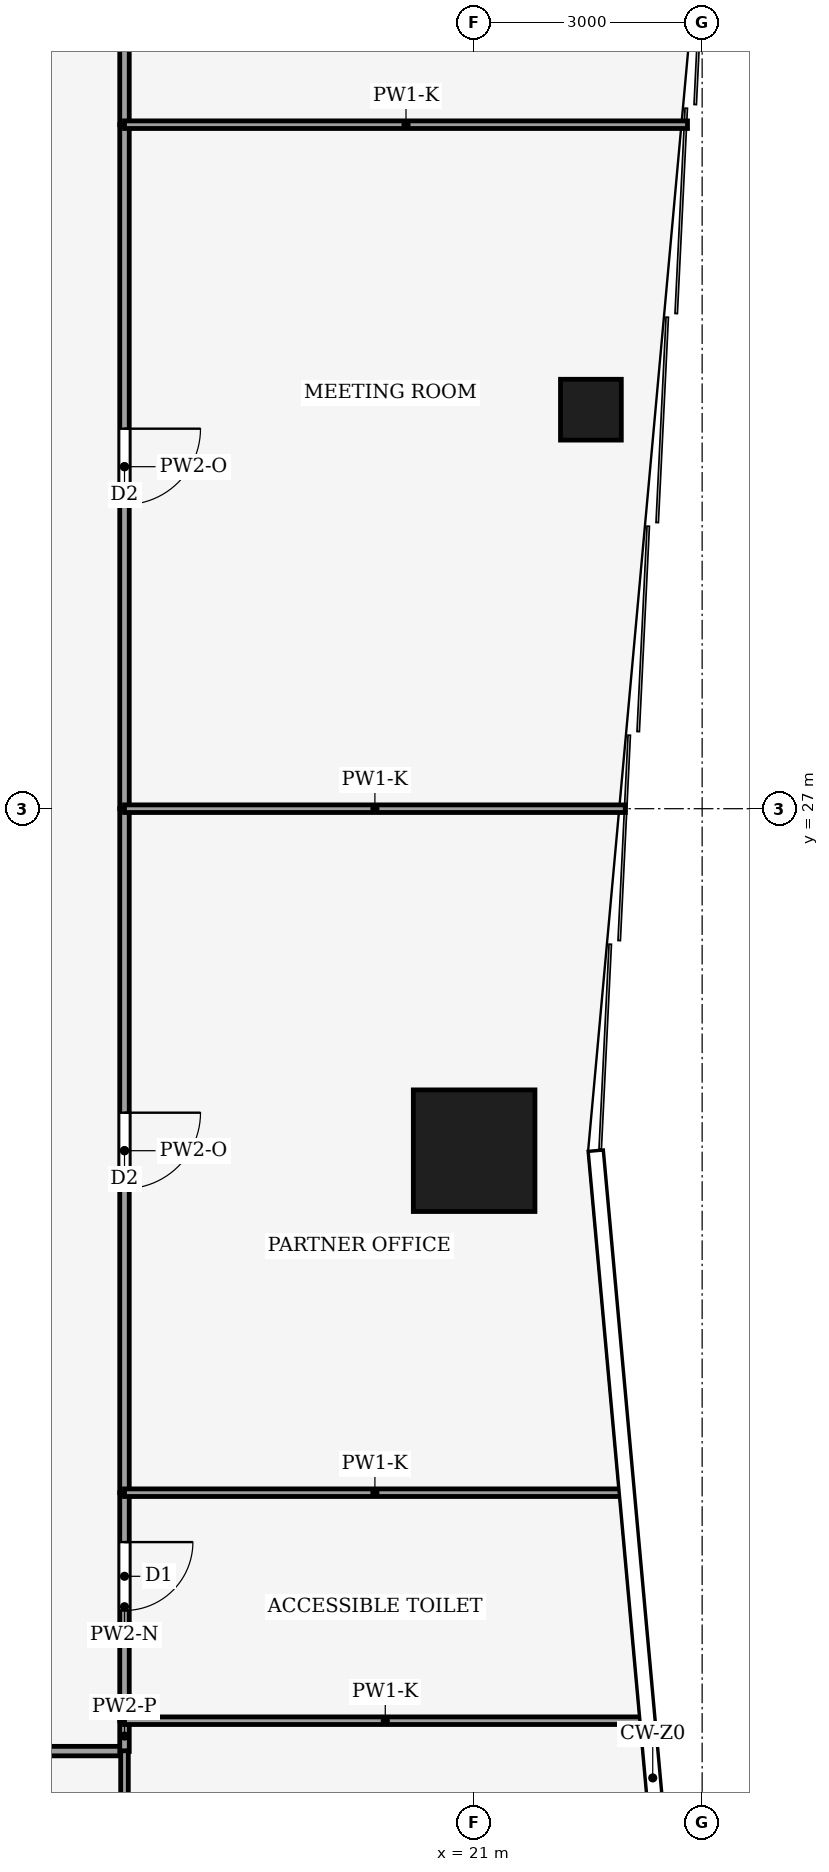
"""IFC4 building model, lengths in metres.
Left out: names, types, materials, properties, quantities, classifications, styles, units other than length and angle.
Written with IfcOpenShell. Run it as: python <this file> out.ifc"""

import sys

from ifc_helpers import new_model, si_unit, direction, frame, frame_2d, origin, origin_2d, place, context, subcontext, project, spatial, rectangle, hollow_rectangle, extrude, element, fill, save


model = new_model("IFC4")
c1 = context("Model", 3, precision=1e-05, world=origin(), true_north=direction((0.0, 1.0)))
c2 = subcontext(c1, "Body", "Model", "MODEL_VIEW")
j1 = project(units=[si_unit("LENGTHUNIT", "METRE"), si_unit("PLANEANGLEUNIT", "RADIAN")], contexts=[c1])
p1 = place(None, origin())
s1 = spatial("IfcSite", under=j1, at=p1, CompositionType="ELEMENT")
p2 = place(p1, origin())
s2 = spatial("IfcBuilding", under=s1, at=p2, CompositionType="ELEMENT")
p3 = place(p2, frame((0.0, 0.0, 54.0)))
s3 = spatial("IfcBuildingStorey", under=s2, at=p3, CompositionType="ELEMENT", Elevation=54.0)
p4 = place(p3, frame((21.0, 22.5, 0.0), z_axis=(0.0, 0.0, 1.0), x_axis=(1.0, 0.0, 0.0)))
e1 = element("IfcColumn", 1, at=p4, inside=s3, PredefinedType="COLUMN", context=c2, shape_type="SweptSolid", body=[
    extrude(hollow_rectangle(XDim=1.6, YDim=1.6, WallThickness=0.09, at=origin_2d()), origin(), (0.0, 0.0, 1.0), 4.0),
])
p5 = place(p3, frame((22.536, 32.25, 0.0), z_axis=(0.0, 0.0, 1.0), x_axis=(1.0, 0.0, 0.0)))
e2 = element("IfcColumn", 2, at=p5, inside=s3, PredefinedType="COLUMN", context=c2, shape_type="SweptSolid", body=[
    extrude(hollow_rectangle(XDim=0.8, YDim=0.8, WallThickness=0.04, at=origin_2d()), origin(), (0.0, 0.0, 1.0), 4.0),
])
p6 = place(p3, frame((16.4, 14.6, 0.0), z_axis=(0.0, 0.0, 1.0), x_axis=(-1.0, 0.0, 0.0)))
e3 = element("IfcWall", 3, at=p6, inside=s3, PredefinedType="PARTITIONING", context=c2, shape_type="SweptSolid", body=[
    extrude(rectangle(XDim=4.4, YDim=0.125, at=frame_2d((2.2, 0.0))), origin(), (0.0, 0.0, 1.0), 3.17),
])
p7 = place(p6, frame((1.7, 0.0, 0.0)))
e4 = element("IfcOpeningElement", 4, at=p7, cuts=e3, PredefinedType="OPENING", context=c2, shape_type="SweptSolid", body=[
    extrude(rectangle(XDim=1.0, YDim=2.1, at=frame_2d((0.5, 1.05))), frame((0.0, 0.073, 0.0), z_axis=(0.0, -1.0, 0.0), x_axis=(1.0, 0.0, 0.0)), (0.0, 0.0, 1.0), 0.145),
])
p8 = place(p3, frame((16.4, 14.596, 0.0), z_axis=(0.0, 0.0, 1.0), x_axis=(0.0, 1.0, 0.0)))
e5 = element("IfcWall", 5, at=p8, inside=s3, PredefinedType="PARTITIONING", context=c2, shape_type="SweptSolid", body=[
    extrude(rectangle(XDim=0.404, YDim=0.125, at=frame_2d((0.202, 0.0))), origin(), (0.0, 0.0, 1.0), 3.75),
])
p9 = place(p3, frame((16.4, 18.0, 0.0), z_axis=(0.0, 0.0, 1.0), x_axis=(0.0, -1.0, 0.0)))
e6 = element("IfcWall", 6, at=p9, inside=s3, PredefinedType="PARTITIONING", context=c2, shape_type="SweptSolid", body=[
    extrude(rectangle(XDim=3.0, YDim=0.125, at=frame_2d((1.5, 0.0))), origin(), (0.0, 0.0, 1.0), 3.02),
])
p10 = place(p9, frame((0.65, 0.0, 0.0)))
e7 = element("IfcOpeningElement", 7, at=p10, cuts=e6, PredefinedType="OPENING", context=c2, shape_type="SweptSolid", body=[
    extrude(rectangle(XDim=0.9, YDim=2.1, at=frame_2d((0.45, 1.05))), frame((0.0, 0.073, 0.0), z_axis=(0.0, -1.0, 0.0), x_axis=(1.0, 0.0, 0.0)), (0.0, 0.0, 1.0), 0.145),
])
p11 = place(p3, frame((16.4, 27.0, 0.0), z_axis=(0.0, 0.0, 1.0), x_axis=(0.0, -1.0, 0.0)))
e8 = element("IfcWall", 8, at=p11, inside=s3, PredefinedType="PARTITIONING", context=c2, shape_type="SweptSolid", body=[
    extrude(rectangle(XDim=9.0, YDim=0.125, at=frame_2d((4.5, 0.0))), origin(), (0.0, 0.0, 1.0), 3.36),
])
p12 = place(p11, frame((4.0, 0.0, 0.0)))
e9 = element("IfcOpeningElement", 9, at=p12, cuts=e8, PredefinedType="OPENING", context=c2, shape_type="SweptSolid", body=[
    extrude(rectangle(XDim=1.0, YDim=2.1, at=frame_2d((0.5, 1.05))), frame((0.0, 0.073, 0.0), z_axis=(0.0, -1.0, 0.0), x_axis=(1.0, 0.0, 0.0)), (0.0, 0.0, 1.0), 0.145),
])
p13 = place(p3, frame((16.4, 36.0, 0.0), z_axis=(0.0, 0.0, 1.0), x_axis=(0.0, -1.0, 0.0)))
e10 = element("IfcWall", 10, at=p13, inside=s3, PredefinedType="PARTITIONING", context=c2, shape_type="SweptSolid", body=[
    extrude(rectangle(XDim=9.0, YDim=0.125, at=frame_2d((4.5, 0.0))), origin(), (0.0, 0.0, 1.0), 3.36),
])
p14 = place(p13, frame((4.0, 0.0, 0.0)))
e11 = element("IfcOpeningElement", 11, at=p14, cuts=e10, PredefinedType="OPENING", context=c2, shape_type="SweptSolid", body=[
    extrude(rectangle(XDim=1.0, YDim=2.1, at=frame_2d((0.5, 1.05))), frame((0.0, 0.073, 0.0), z_axis=(0.0, -1.0, 0.0), x_axis=(1.0, 0.0, 0.0)), (0.0, 0.0, 1.0), 0.145),
])
p15 = place(p3, frame((16.4, 41.404, 0.0), z_axis=(0.0, 0.0, 1.0), x_axis=(0.0, -1.0, 0.0)))
e12 = element("IfcWall", 12, at=p15, inside=s3, PredefinedType="PARTITIONING", context=c2, shape_type="SweptSolid", body=[
    extrude(rectangle(XDim=5.404, YDim=0.125, at=frame_2d((2.702, 0.0))), origin(), (0.0, 0.0, 1.0), 3.02),
])
p16 = place(p15, frame((2.202, 0.0, 0.0)))
e13 = element("IfcOpeningElement", 13, at=p16, cuts=e12, PredefinedType="OPENING", context=c2, shape_type="SweptSolid", body=[
    extrude(rectangle(XDim=1.0, YDim=2.1, at=frame_2d((0.5, 1.05))), frame((0.0, 0.073, 0.0), z_axis=(0.0, -1.0, 0.0), x_axis=(1.0, 0.0, 0.0)), (0.0, 0.0, 1.0), 0.145),
])
p17 = place(p3, frame((16.4, 12.0, 0.0), z_axis=(0.0, 0.0, 1.0), x_axis=(0.0, 1.0, 0.0)))
e14 = element("IfcWall", 14, at=p17, inside=s3, PredefinedType="PARTITIONING", context=c2, shape_type="SweptSolid", body=[
    extrude(rectangle(XDim=2.604, YDim=0.1, at=frame_2d((1.302, 0.0))), origin(), (0.0, 0.0, 1.0), 3.75),
])
p18 = place(p3, frame((23.262, 15.0, 0.0), z_axis=(0.0, 0.0, 1.0), x_axis=(-1.0, 0.0, 0.0)))
e15 = element("IfcWall", 15, at=p18, inside=s3, PredefinedType="PARTITIONING", context=c2, shape_type="SweptSolid", body=[
    extrude(rectangle(XDim=6.862, YDim=0.1, at=frame_2d((3.431, 0.0))), origin(), (0.0, 0.0, 1.0), 2.92),
])
for number, where, z_axis, x_axis in (
    (16, (22.989, 18.0, 0.0), (0.0, 0.0, 1.0), (-1.0, 0.0, 0.0)),
    (17, (22.989, 27.0, 0.0), (0.0, 0.0, 1.0), (-1.0, 0.0, 0.0)),
):
    element("IfcWall", number, at=place(p3, frame(where, z_axis=z_axis, x_axis=x_axis)), inside=s3, PredefinedType="PARTITIONING", context=c2, shape_type="SweptSolid", body=[
        extrude(rectangle(XDim=6.589, YDim=0.1, at=frame_2d((3.294, 0.0))), origin(), (0.0, 0.0, 1.0), 2.92),
    ])
p19 = place(p3, frame((23.807, 36.0, 0.0), z_axis=(0.0, 0.0, 1.0), x_axis=(-1.0, 0.0, 0.0)))
e18 = element("IfcWall", 18, at=p19, inside=s3, PredefinedType="PARTITIONING", context=c2, shape_type="SweptSolid", body=[
    extrude(rectangle(XDim=7.407, YDim=0.1, at=frame_2d((3.704, 0.0))), origin(), (0.0, 0.0, 1.0), 2.92),
])
p20 = place(p10, origin())
e19 = element("IfcDoor", 19, at=p20, inside=s3, OperationType="SINGLE_SWING_LEFT", PredefinedType="DOOR", context=c2, shape_type="SweptSolid", body=[
    extrude(rectangle(XDim=0.9, YDim=2.1, at=frame_2d((0.45, 1.05))), frame((0.0, 0.025, 0.0), z_axis=(0.0, -1.0, 0.0), x_axis=(1.0, 0.0, 0.0)), (0.0, 0.0, 1.0), 0.05),
])
fill(e7, e19)
p21 = place(p12, origin())
e20 = element("IfcDoor", 20, at=p21, inside=s3, OperationType="SINGLE_SWING_RIGHT", PredefinedType="DOOR", context=c2, shape_type="SweptSolid", body=[
    extrude(rectangle(XDim=1.0, YDim=2.1, at=frame_2d((0.5, 1.05))), frame((0.0, 0.025, 0.0), z_axis=(0.0, -1.0, 0.0), x_axis=(1.0, 0.0, 0.0)), (0.0, 0.0, 1.0), 0.05),
])
fill(e9, e20)
p22 = place(p14, origin())
e21 = element("IfcDoor", 21, at=p22, inside=s3, OperationType="SINGLE_SWING_LEFT", PredefinedType="DOOR", context=c2, shape_type="SweptSolid", body=[
    extrude(rectangle(XDim=1.0, YDim=2.1, at=frame_2d((0.5, 1.05))), frame((0.0, 0.025, 0.0), z_axis=(0.0, -1.0, 0.0), x_axis=(1.0, 0.0, 0.0)), (0.0, 0.0, 1.0), 0.05),
])
fill(e11, e21)
save(model, sys.argv[1])
